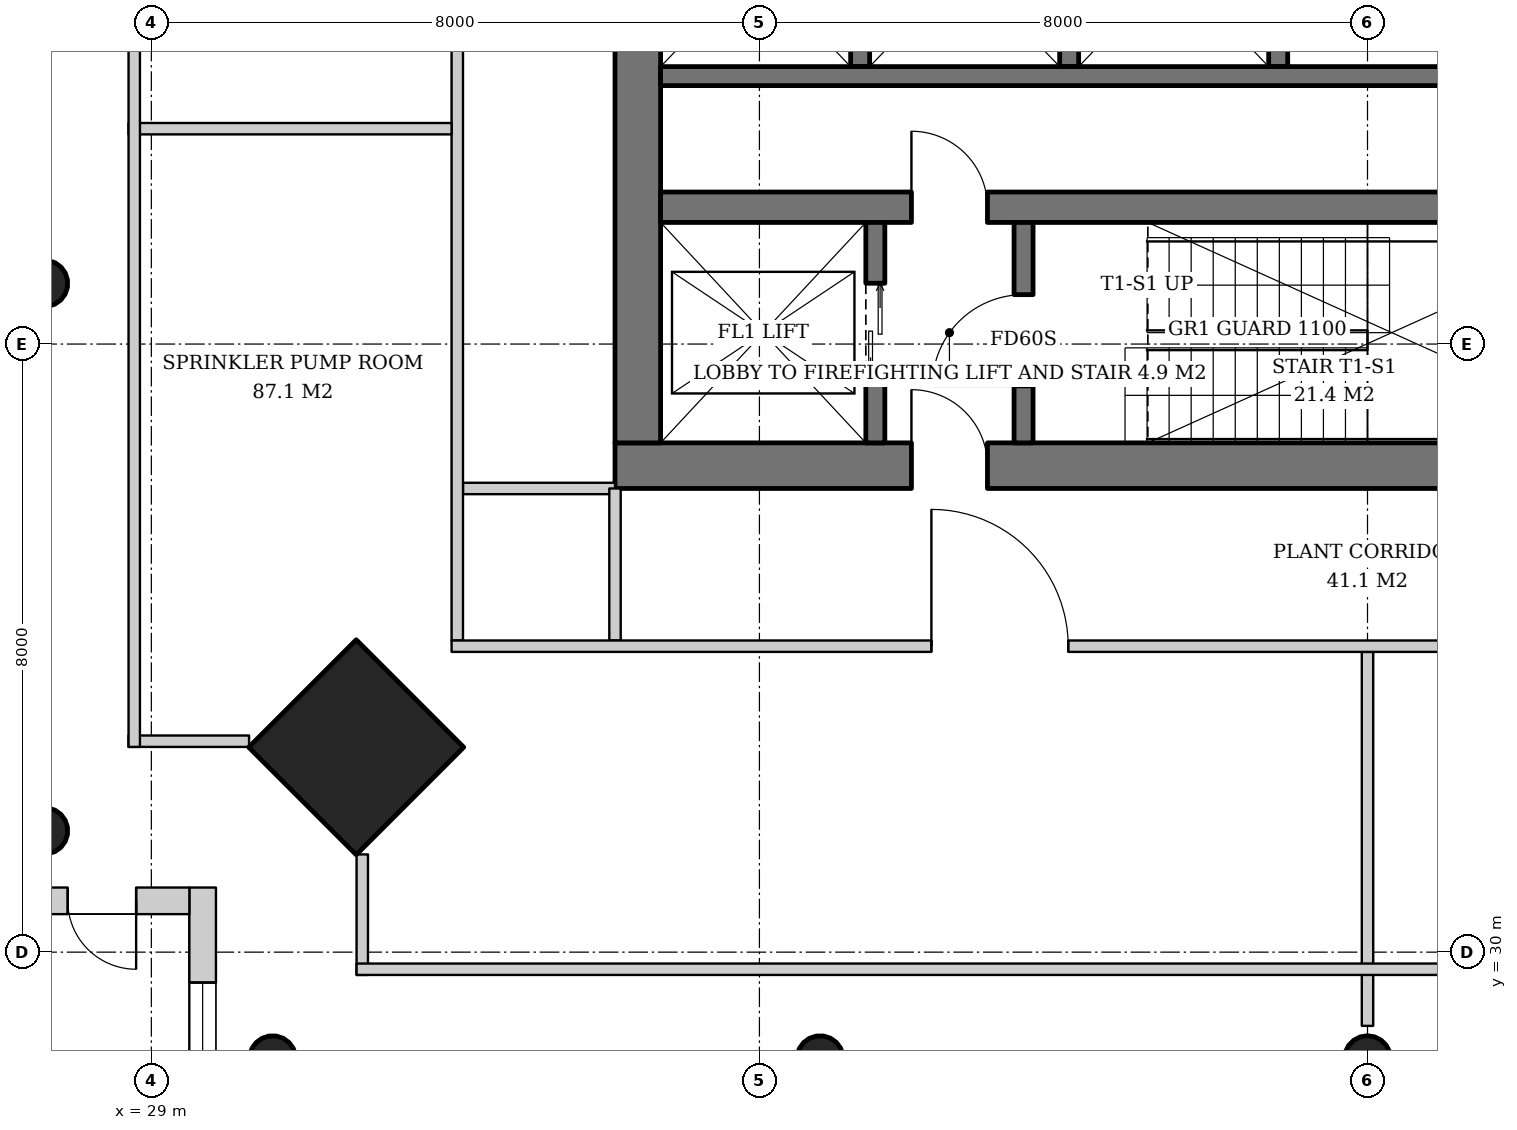
"""IFC4 building model, lengths in metres.
Left out: names, types, materials, properties, quantities, classifications, styles, units other than length and angle.
Written with IfcOpenShell. Run it as: python <this file> out.ifc"""

import sys

from ifc_helpers import new_model, si_unit, direction, frame, frame_2d, origin, origin_2d, place, context, subcontext, project, spatial, rectangle, hollow_circle, extrude, element, fill, save


model = new_model("IFC4")
c1 = context("Model", 3, precision=1e-05, world=origin(), true_north=direction((0.0, 1.0)))
c2 = subcontext(c1, "Body", "Model", "MODEL_VIEW")
j1 = project(units=[si_unit("LENGTHUNIT", "METRE"), si_unit("PLANEANGLEUNIT", "RADIAN")], contexts=[c1])
p1 = place(None, origin())
s1 = spatial("IfcSite", under=j1, at=p1, CompositionType="ELEMENT")
p2 = place(p1, origin())
s2 = spatial("IfcBuilding", under=s1, at=p2, CompositionType="ELEMENT")
p3 = place(p2, frame((0.0, 0.0, 226.2)))
s3 = spatial("IfcBuildingStorey", under=s2, at=p3, CompositionType="ELEMENT", Elevation=226.2)
p4 = place(p3, frame((31.657, 32.657, 0.0), z_axis=(0.031898107953, 0.031898107953, 0.998981992539), x_axis=(-0.707106781187, 0.707106781187, 0.0)))
e1 = element("IfcColumn", 1, at=p4, inside=s3, PredefinedType="COLUMN", context=c2, shape_type="SweptSolid", body=[
    extrude(rectangle(XDim=2.0, YDim=2.0, at=origin_2d()), origin(), (0.0, 0.0, 1.0), 3.804),
])
p5 = place(p3, frame((27.557, 31.557, 0.0), z_axis=(0.031898107953, 0.031898107953, 0.998981992539), x_axis=(-0.707106781187, 0.707106781187, 0.0)))
e2 = element("IfcColumn", 2, at=p5, inside=s3, PredefinedType="COLUMN", context=c2, shape_type="SweptSolid", body=[
    extrude(hollow_circle(Radius=0.305, WallThickness=0.025, at=origin_2d()), origin(), (0.0, 0.0, 1.0), 3.804),
])
p6 = place(p3, frame((27.557, 38.779, 0.0), z_axis=(0.031910269556, 0.015987237665, 0.999362868496), x_axis=(-0.447933021895, 0.894067115991, 0.0)))
e3 = element("IfcColumn", 3, at=p6, inside=s3, PredefinedType="COLUMN", context=c2, shape_type="SweptSolid", body=[
    extrude(hollow_circle(Radius=0.305, WallThickness=0.025, at=origin_2d()), origin(), (0.0, 0.0, 1.0), 3.802),
])
p7 = place(p3, frame((30.557, 28.557, 0.0), z_axis=(0.031898107953, 0.031898107953, 0.998981992539), x_axis=(-0.707106781187, 0.707106781187, 0.0)))
e4 = element("IfcColumn", 4, at=p7, inside=s3, PredefinedType="COLUMN", context=c2, shape_type="SweptSolid", body=[
    extrude(hollow_circle(Radius=0.305, WallThickness=0.025, at=origin_2d()), origin(), (0.0, 0.0, 1.0), 3.804),
])
p8 = place(p3, frame((37.779, 28.557, 0.0), z_axis=(0.015987237665, 0.031910269556, 0.999362868496), x_axis=(-0.894067115991, 0.447933021895, 0.0)))
e5 = element("IfcColumn", 5, at=p8, inside=s3, PredefinedType="COLUMN", context=c2, shape_type="SweptSolid", body=[
    extrude(hollow_circle(Radius=0.305, WallThickness=0.025, at=origin_2d()), origin(), (0.0, 0.0, 1.0), 3.802),
])
p9 = place(p3, frame((45.0, 28.557, 0.0), z_axis=(0.0, 0.031914348339, 0.999490607445), x_axis=(-1.0, 0.0, 0.0)))
e6 = element("IfcColumn", 6, at=p9, inside=s3, PredefinedType="COLUMN", context=c2, shape_type="SweptSolid", body=[
    extrude(hollow_circle(Radius=0.305, WallThickness=0.025, at=origin_2d()), origin(), (0.0, 0.0, 1.0), 3.802),
])
p10 = place(p3, frame((35.1, 36.4, 0.0), z_axis=(0.0, 0.0, 1.0), x_axis=(1.0, 0.0, 0.0)))
e7 = element("IfcWall", 7, at=p10, inside=s3, PredefinedType="SHEAR", context=c2, shape_type="SweptSolid", body=[
    extrude(rectangle(XDim=19.8, YDim=0.6, at=frame_2d((9.9, 0.0))), origin(), (0.0, 0.0, 1.0), 3.8),
])
p11 = place(p10, frame((3.9, 0.0, 0.0)))
e8 = element("IfcOpeningElement", 8, at=p11, cuts=e7, PredefinedType="OPENING", context=c2, shape_type="SweptSolid", body=[
    extrude(rectangle(XDim=1.0, YDim=2.1, at=frame_2d((0.5, 1.05))), frame((0.0, 0.31, 0.0), z_axis=(0.0, -1.0, 0.0), x_axis=(1.0, 0.0, 0.0)), (0.0, 0.0, 1.0), 0.62),
])
p12 = place(p10, frame((15.35, 0.0, 0.0)))
e9 = element("IfcOpeningElement", 9, at=p12, cuts=e7, PredefinedType="OPENING", context=c2, shape_type="SweptSolid", body=[
    extrude(rectangle(XDim=1.0, YDim=2.1, at=frame_2d((0.5, 1.05))), frame((0.0, 0.31, 0.0), z_axis=(0.0, -1.0, 0.0), x_axis=(1.0, 0.0, 0.0)), (0.0, 0.0, 1.0), 0.62),
])
p13 = place(p3, frame((35.4, 36.7, 0.0), z_axis=(0.0, 0.0, 1.0), x_axis=(0.0, 1.0, 0.0)))
e10 = element("IfcWall", 10, at=p13, inside=s3, PredefinedType="SHEAR", context=c2, shape_type="SweptSolid", body=[
    extrude(rectangle(XDim=18.6, YDim=0.6, at=frame_2d((9.3, 0.0))), origin(), (0.0, 0.0, 1.0), 3.8),
])
p14 = place(p13, frame((8.4, 0.0, 0.0)))
e11 = element("IfcOpeningElement", 11, at=p14, cuts=e10, PredefinedType="OPENING", context=c2, shape_type="SweptSolid", body=[
    extrude(rectangle(XDim=1.8, YDim=2.4, at=frame_2d((0.9, 1.2))), frame((0.0, 0.31, 0.0), z_axis=(0.0, -1.0, 0.0), x_axis=(1.0, 0.0, 0.0)), (0.0, 0.0, 1.0), 0.62),
])
p15 = place(p3, frame((35.7, 39.8, 0.0), z_axis=(0.0, 0.0, 1.0), x_axis=(1.0, 0.0, 0.0)))
e12 = element("IfcWall", 12, at=p15, inside=s3, PredefinedType="SHEAR", context=c2, shape_type="SweptSolid", body=[
    extrude(rectangle(XDim=18.6, YDim=0.4, at=frame_2d((9.3, 0.0))), origin(), (0.0, 0.0, 1.0), 3.8),
])
p16 = place(p15, frame((3.3, 0.0, 0.0)))
e13 = element("IfcOpeningElement", 13, at=p16, cuts=e12, PredefinedType="OPENING", context=c2, shape_type="SweptSolid", body=[
    extrude(rectangle(XDim=1.0, YDim=2.1, at=frame_2d((0.5, 1.05))), frame((0.0, 0.21, 0.0), z_axis=(0.0, -1.0, 0.0), x_axis=(1.0, 0.0, 0.0)), (0.0, 0.0, 1.0), 0.42),
])
p17 = place(p3, frame((29.675, 27.5, 0.0), z_axis=(0.0, 0.0, 1.0), x_axis=(0.0, 1.0, 0.0)))
e14 = element("IfcWall", 14, at=p17, inside=s3, PredefinedType="SOLIDWALL", context=c2, shape_type="SweptSolid", body=[
    extrude(rectangle(XDim=3.35, YDim=0.35, at=frame_2d((1.675, 0.0))), origin(), (0.0, 0.0, 1.0), 3.52),
])
p18 = place(p17, frame((0.9, 0.0, 0.6)))
e15 = element("IfcOpeningElement", 15, at=p18, cuts=e14, PredefinedType="OPENING", context=c2, shape_type="SweptSolid", body=[
    extrude(rectangle(XDim=1.2, YDim=2.55, at=frame_2d((0.6, 1.275))), frame((0.0, 0.185, 0.0), z_axis=(0.0, -1.0, 0.0), x_axis=(1.0, 0.0, 0.0)), (0.0, 0.0, 1.0), 0.37),
])
p19 = place(p3, frame((29.5, 30.675, 0.0), z_axis=(0.0, 0.0, 1.0), x_axis=(-1.0, 0.0, 0.0)))
e16 = element("IfcWall", 16, at=p19, inside=s3, PredefinedType="SOLIDWALL", context=c2, shape_type="SweptSolid", body=[
    extrude(rectangle(XDim=3.0, YDim=0.35, at=frame_2d((1.5, 0.0))), origin(), (0.0, 0.0, 1.0), 3.52),
])
p20 = place(p19, frame((0.7, 0.0, 0.0)))
e17 = element("IfcOpeningElement", 17, at=p20, cuts=e16, PredefinedType="OPENING", context=c2, shape_type="SweptSolid", body=[
    extrude(rectangle(XDim=0.9, YDim=2.1, at=frame_2d((0.45, 1.05))), frame((0.0, 0.185, 0.0), z_axis=(0.0, -1.0, 0.0), x_axis=(1.0, 0.0, 0.0)), (0.0, 0.0, 1.0), 0.37),
])
p21 = place(p3, frame((38.525, 36.7, 0.0), z_axis=(0.0, 0.0, 1.0), x_axis=(0.0, 1.0, 0.0)))
e18 = element("IfcWall", 18, at=p21, inside=s3, PredefinedType="SHEAR", context=c2, shape_type="SweptSolid", body=[
    extrude(rectangle(XDim=2.9, YDim=0.25, at=frame_2d((1.45, 0.0))), origin(), (0.0, 0.0, 1.0), 3.8),
])
p22 = place(p21, frame((0.8, 0.0, 0.0)))
e19 = element("IfcOpeningElement", 19, at=p22, cuts=e18, PredefinedType="OPENING", context=c2, shape_type="SweptSolid", body=[
    extrude(rectangle(XDim=1.3, YDim=2.2, at=frame_2d((0.65, 1.1))), frame((0.0, 0.135, 0.0), z_axis=(0.0, -1.0, 0.0), x_axis=(1.0, 0.0, 0.0)), (0.0, 0.0, 1.0), 0.27),
])
p23 = place(p3, frame((40.475, 36.7, 0.0), z_axis=(0.0, 0.0, 1.0), x_axis=(0.0, 1.0, 0.0)))
e20 = element("IfcWall", 20, at=p23, inside=s3, PredefinedType="SHEAR", context=c2, shape_type="SweptSolid", body=[
    extrude(rectangle(XDim=2.9, YDim=0.25, at=frame_2d((1.45, 0.0))), origin(), (0.0, 0.0, 1.0), 3.8),
])
p24 = place(p23, frame((0.75, 0.0, 0.0)))
e21 = element("IfcOpeningElement", 21, at=p24, cuts=e20, PredefinedType="OPENING", context=c2, shape_type="SweptSolid", body=[
    extrude(rectangle(XDim=1.2, YDim=2.1, at=frame_2d((0.6, 1.05))), frame((0.0, 0.135, 0.0), z_axis=(0.0, -1.0, 0.0), x_axis=(1.0, 0.0, 0.0)), (0.0, 0.0, 1.0), 0.27),
])
for number, where, z_axis, x_axis in (
    (22, (38.325, 44.25, 0.0), (0.0, 0.0, 1.0), (0.0, -1.0, 0.0)),
    (23, (41.075, 44.25, 0.0), (0.0, 0.0, 1.0), (0.0, -1.0, 0.0)),
    (24, (43.825, 44.25, 0.0), (0.0, 0.0, 1.0), (0.0, -1.0, 0.0)),
):
    element("IfcWall", number, at=place(p3, frame(where, z_axis=z_axis, x_axis=x_axis)), inside=s3, PredefinedType="SHEAR", context=c2, shape_type="SweptSolid", body=[
        extrude(rectangle(XDim=2.6, YDim=0.25, at=frame_2d((1.3, 0.0))), origin(), (0.0, 0.0, 1.0), 3.8),
    ])
p25 = place(p3, frame((35.7, 41.525, 0.0), z_axis=(0.0, 0.0, 1.0), x_axis=(1.0, 0.0, 0.0)))
e25 = element("IfcWall", 25, at=p25, inside=s3, PredefinedType="SHEAR", context=c2, shape_type="SweptSolid", body=[
    extrude(rectangle(XDim=11.0, YDim=0.25, at=frame_2d((5.5, 0.0))), origin(), (0.0, 0.0, 1.0), 3.8),
])
p26 = place(p3, frame((35.1, 36.1, 0.0), z_axis=(0.0, 0.0, 1.0), x_axis=(-1.0, 0.0, 0.0)))
e26 = element("IfcWall", 26, at=p26, inside=s3, PredefinedType="PARTITIONING", context=c2, shape_type="SweptSolid", body=[
    extrude(rectangle(XDim=2.0, YDim=0.15, at=frame_2d((1.0, 0.0))), origin(), (0.0, 0.0, 1.0), 3.52),
])
p27 = place(p3, frame((33.025, 58.05, 0.0), z_axis=(0.0, 0.0, 1.0), x_axis=(0.0, -1.0, 0.0)))
e27 = element("IfcWall", 27, at=p27, inside=s3, PredefinedType="SOLIDWALL", context=c2, shape_type="SweptSolid", body=[
    extrude(rectangle(XDim=23.95, YDim=0.15, at=frame_2d((11.975, 0.0))), origin(), (0.0, 0.0, 1.0), 2.706),
])
p28 = place(p27, frame((6.312, 0.0, 0.0)))
e28 = element("IfcOpeningElement", 28, at=p28, cuts=e27, PredefinedType="OPENING", context=c2, shape_type="SweptSolid", body=[
    extrude(rectangle(XDim=1.8, YDim=2.4, at=frame_2d((0.9, 1.2))), frame((0.0, 0.085, 0.0), z_axis=(0.0, -1.0, 0.0), x_axis=(1.0, 0.0, 0.0)), (0.0, 0.0, 1.0), 0.17),
])
p29 = place(p27, frame((13.733, 0.0, 0.0)))
e29 = element("IfcOpeningElement", 29, at=p29, cuts=e27, PredefinedType="OPENING", context=c2, shape_type="SweptSolid", body=[
    extrude(rectangle(XDim=1.8, YDim=2.4, at=frame_2d((0.9, 1.2))), frame((0.0, 0.085, 0.0), z_axis=(0.0, -1.0, 0.0), x_axis=(1.0, 0.0, 0.0)), (0.0, 0.0, 1.0), 0.17),
])
p30 = place(p3, frame((32.95, 40.833, 0.0), z_axis=(0.0, 0.0, 1.0), x_axis=(-1.0, 0.0, 0.0)))
e30 = element("IfcWall", 30, at=p30, inside=s3, PredefinedType="SOLIDWALL", context=c2, shape_type="SweptSolid", body=[
    extrude(rectangle(XDim=4.25, YDim=0.15, at=frame_2d((2.125, 0.0))), origin(), (0.0, 0.0, 1.0), 3.52),
])
p31 = place(p3, frame((35.1, 36.1, 0.0), z_axis=(0.0, 0.0, 1.0), x_axis=(0.0, -1.0, 0.0)))
e31 = element("IfcWall", 31, at=p31, inside=s3, PredefinedType="PARTITIONING", context=c2, shape_type="SweptSolid", body=[
    extrude(rectangle(XDim=2.0, YDim=0.15, at=frame_2d((1.0, 0.0))), origin(), (0.0, 0.0, 1.0), 3.52),
])
p32 = place(p3, frame((45.0, 33.95, 0.0), z_axis=(0.0, 0.0, 1.0), x_axis=(0.0, -1.0, 0.0)))
e32 = element("IfcWall", 32, at=p32, inside=s3, PredefinedType="SOLIDWALL", context=c2, shape_type="SweptSolid", body=[
    extrude(rectangle(XDim=4.92, YDim=0.15, at=frame_2d((2.46, 0.0))), origin(), (0.0, 0.0, 1.0), 3.52),
])
p33 = place(p3, frame((32.95, 34.025, 0.0), z_axis=(0.0, 0.0, 1.0), x_axis=(1.0, 0.0, 0.0)))
e33 = element("IfcWall", 33, at=p33, inside=s3, PredefinedType="SOLIDWALL", context=c2, shape_type="SweptSolid", body=[
    extrude(rectangle(XDim=23.95, YDim=0.15, at=frame_2d((11.975, 0.0))), origin(), (0.0, 0.0, 1.0), 2.706),
])
p34 = place(p33, frame((6.312, 0.0, 0.0)))
e34 = element("IfcOpeningElement", 34, at=p34, cuts=e33, PredefinedType="OPENING", context=c2, shape_type="SweptSolid", body=[
    extrude(rectangle(XDim=1.8, YDim=2.4, at=frame_2d((0.9, 1.2))), frame((0.0, 0.085, 0.0), z_axis=(0.0, -1.0, 0.0), x_axis=(1.0, 0.0, 0.0)), (0.0, 0.0, 1.0), 0.17),
])
p35 = place(p33, frame((13.733, 0.0, 0.0)))
e35 = element("IfcOpeningElement", 35, at=p35, cuts=e33, PredefinedType="OPENING", context=c2, shape_type="SweptSolid", body=[
    extrude(rectangle(XDim=1.8, YDim=2.4, at=frame_2d((0.9, 1.2))), frame((0.0, 0.085, 0.0), z_axis=(0.0, -1.0, 0.0), x_axis=(1.0, 0.0, 0.0)), (0.0, 0.0, 1.0), 0.17),
])
for number, where, z_axis, x_axis in (
    (36, (31.775, 29.7, 0.0), (0.0, 0.0, 1.0), (0.0, 1.0, 0.0)),
    (37, (30.286, 32.775, 0.0), (0.0, 0.0, 1.0), (-1.0, 0.0, 0.0)),
):
    element("IfcWall", number, at=place(p3, frame(where, z_axis=z_axis, x_axis=x_axis)), inside=s3, PredefinedType="PARTITIONING", context=c2, shape_type="SweptSolid", body=[
        extrude(rectangle(XDim=1.586, YDim=0.15, at=frame_2d((0.793, 0.0))), origin(), (0.0, 0.0, 1.0), 3.52),
    ])
for number, where, z_axis, x_axis in (
    (38, (28.775, 32.7, 0.0), (0.0, 0.0, 1.0), (0.0, 1.0, 0.0)),
    (39, (58.3, 29.775, 0.0), (0.0, 0.0, 1.0), (-1.0, 0.0, 0.0)),
):
    element("IfcWall", number, at=place(p3, frame(where, z_axis=z_axis, x_axis=x_axis)), inside=s3, PredefinedType="PARTITIONING", context=c2, shape_type="SweptSolid", body=[
        extrude(rectangle(XDim=26.6, YDim=0.15, at=frame_2d((13.3, 0.0))), origin(), (0.0, 0.0, 1.0), 2.706),
    ])
p36 = place(p18, origin())
e40 = element("IfcWindow", 40, at=p36, inside=s3, PartitioningType="SINGLE_PANEL", PredefinedType="USERDEFINED", context=c2, shape_type="SweptSolid", body=[
    extrude(rectangle(XDim=1.2, YDim=2.55, at=frame_2d((0.6, 1.275))), frame((0.0, 0.03, 0.0), z_axis=(0.0, -1.0, 0.0), x_axis=(1.0, 0.0, 0.0)), (0.0, 0.0, 1.0), 0.06),
])
fill(e15, e40)
p37 = place(p20, origin())
e41 = element("IfcDoor", 41, at=p37, inside=s3, OperationType="SINGLE_SWING_LEFT", PredefinedType="DOOR", context=c2, shape_type="SweptSolid", body=[
    extrude(rectangle(XDim=0.9, YDim=2.1, at=frame_2d((0.45, 1.05))), frame((0.0, 0.025, 0.0), z_axis=(0.0, -1.0, 0.0), x_axis=(1.0, 0.0, 0.0)), (0.0, 0.0, 1.0), 0.05),
])
fill(e17, e41)
p38 = place(p22, origin())
e42 = element("IfcDoor", 42, at=p38, inside=s3, OperationType="DOUBLE_DOOR_SLIDING", PredefinedType="DOOR", context=c2, shape_type="SweptSolid", body=[
    extrude(rectangle(XDim=1.3, YDim=2.2, at=frame_2d((0.65, 1.1))), frame((0.0, 0.025, 0.0), z_axis=(0.0, -1.0, 0.0), x_axis=(1.0, 0.0, 0.0)), (0.0, 0.0, 1.0), 0.05),
])
fill(e19, e42)
p39 = place(p24, origin())
e43 = element("IfcDoor", 43, at=p39, inside=s3, OperationType="SINGLE_SWING_LEFT", PredefinedType="DOOR", context=c2, shape_type="SweptSolid", body=[
    extrude(rectangle(XDim=1.2, YDim=2.1, at=frame_2d((0.6, 1.05))), frame((0.0, 0.025, 0.0), z_axis=(0.0, -1.0, 0.0), x_axis=(1.0, 0.0, 0.0)), (0.0, 0.0, 1.0), 0.05),
])
fill(e21, e43)
p40 = place(p11, origin())
e44 = element("IfcDoor", 44, at=p40, inside=s3, OperationType="SINGLE_SWING_LEFT", PredefinedType="DOOR", context=c2, shape_type="SweptSolid", body=[
    extrude(rectangle(XDim=1.0, YDim=2.1, at=frame_2d((0.5, 1.05))), frame((0.0, 0.025, 0.0), z_axis=(0.0, -1.0, 0.0), x_axis=(1.0, 0.0, 0.0)), (0.0, 0.0, 1.0), 0.05),
])
fill(e8, e44)
p41 = place(p16, origin())
e45 = element("IfcDoor", 45, at=p41, inside=s3, OperationType="SINGLE_SWING_LEFT", PredefinedType="DOOR", context=c2, shape_type="SweptSolid", body=[
    extrude(rectangle(XDim=1.0, YDim=2.1, at=frame_2d((0.5, 1.05))), frame((0.0, 0.025, 0.0), z_axis=(0.0, -1.0, 0.0), x_axis=(1.0, 0.0, 0.0)), (0.0, 0.0, 1.0), 0.05),
])
fill(e13, e45)
p42 = place(p34, origin())
e46 = element("IfcDoor", 46, at=p42, inside=s3, OperationType="DOUBLE_DOOR_SINGLE_SWING", PredefinedType="DOOR", context=c2, shape_type="SweptSolid", body=[
    extrude(rectangle(XDim=1.8, YDim=2.4, at=frame_2d((0.9, 1.2))), frame((0.0, 0.025, 0.0), z_axis=(0.0, -1.0, 0.0), x_axis=(1.0, 0.0, 0.0)), (0.0, 0.0, 1.0), 0.05),
])
fill(e34, e46)
save(model, sys.argv[1])
